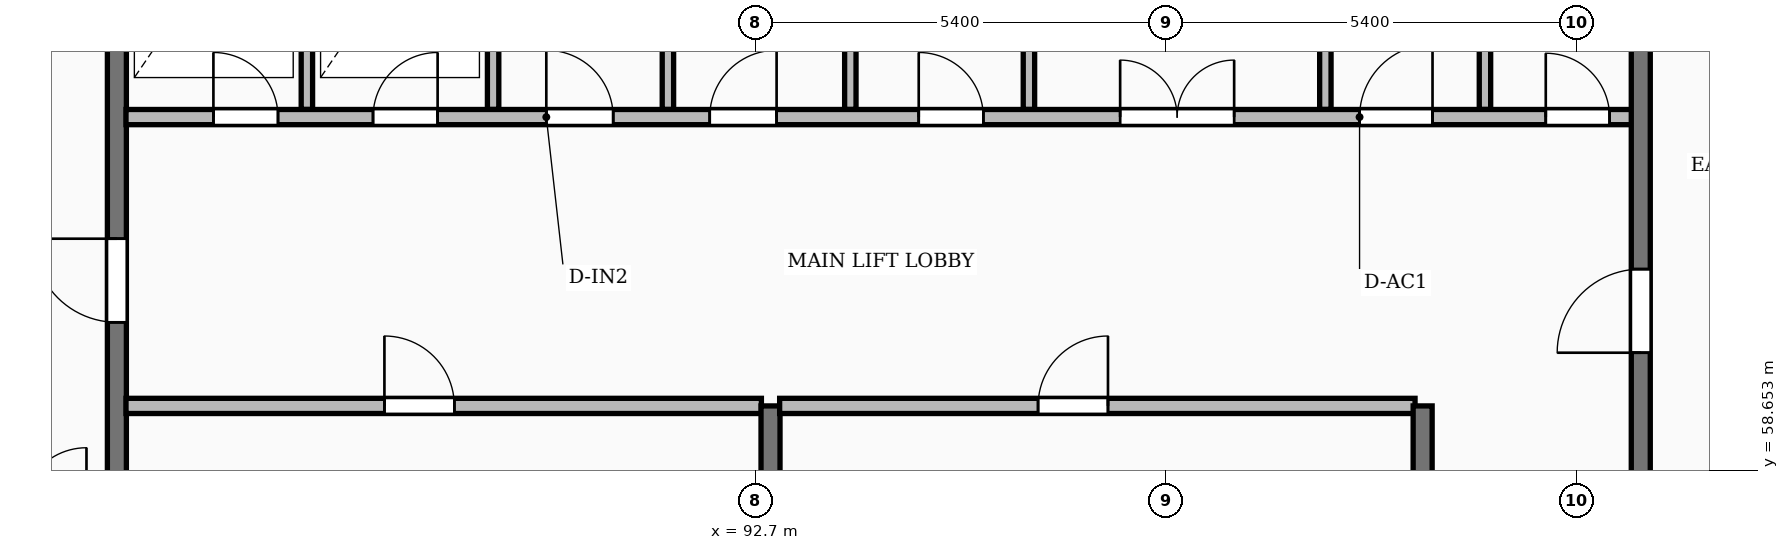
"""IFC4 building model, lengths in metres.
Left out: names, types, materials, properties, quantities, classifications, styles, units other than length and angle.
Written with IfcOpenShell. Run it as: python <this file> out.ifc"""

import sys

from ifc_helpers import new_model, si_unit, direction, frame, frame_2d, origin, place, context, subcontext, project, spatial, rectangle, extrude, element, fill, save


model = new_model("IFC4")
c1 = context("Model", 3, precision=1e-05, world=origin(), true_north=direction((0.0, 1.0)))
c2 = subcontext(c1, "Body", "Model", "MODEL_VIEW")
j1 = project(units=[si_unit("LENGTHUNIT", "METRE"), si_unit("PLANEANGLEUNIT", "RADIAN")], contexts=[c1])
p1 = place(None, origin())
s1 = spatial("IfcSite", under=j1, at=p1, CompositionType="ELEMENT")
p2 = place(p1, origin())
s2 = spatial("IfcBuilding", under=s1, at=p2, CompositionType="ELEMENT")
p3 = place(p2, frame((0.0, 0.0, 210.85)))
s3 = spatial("IfcBuildingStorey", under=s2, at=p3, CompositionType="ELEMENT", Elevation=210.85)
p4 = place(p3, frame((84.3, 55.4, 0.0), z_axis=(0.0, 0.0, 1.0), x_axis=(0.0, 1.0, 0.0)))
e1 = element("IfcWall", 1, at=p4, inside=s3, PredefinedType="SHEAR", context=c2, shape_type="SweptSolid", body=[
    extrude(rectangle(XDim=11.6, YDim=0.25, at=frame_2d((5.8, 0.0))), origin(), (0.0, 0.0, 1.0), 3.25),
])
p5 = place(p4, frame((5.2, 0.0, 0.0)))
e2 = element("IfcOpeningElement", 2, at=p5, cuts=e1, PredefinedType="OPENING", context=c2, shape_type="SweptSolid", body=[
    extrude(rectangle(XDim=1.1, YDim=2.1, at=frame_2d((0.55, 1.05))), frame((0.0, 0.135, 0.0), z_axis=(0.0, -1.0, 0.0), x_axis=(1.0, 0.0, 0.0)), (0.0, 0.0, 1.0), 0.27),
])
p6 = place(p3, frame((84.42, 59.5, 0.0), z_axis=(0.0, 0.0, 1.0), x_axis=(1.0, 0.0, 0.0)))
e3 = element("IfcWall", 3, at=p6, inside=s3, PredefinedType="PARTITIONING", context=c2, shape_type="SweptSolid", body=[
    extrude(rectangle(XDim=8.36, YDim=0.2, at=frame_2d((4.18, 0.0))), origin(), (0.0, 0.0, 1.0), 2.97),
])
p7 = place(p6, frame((3.4, 0.0, 0.0)))
e4 = element("IfcOpeningElement", 4, at=p7, cuts=e3, PredefinedType="OPENING", context=c2, shape_type="SweptSolid", body=[
    extrude(rectangle(XDim=0.92, YDim=2.08, at=frame_2d((0.46, 1.04))), frame((0.0, 0.11, 0.0), z_axis=(0.0, -1.0, 0.0), x_axis=(1.0, 0.0, 0.0)), (0.0, 0.0, 1.0), 0.22),
])
p8 = place(p3, frame((92.9, 55.4, 0.0), z_axis=(0.0, 0.0, 1.0), x_axis=(0.0, 1.0, 0.0)))
e5 = element("IfcWall", 5, at=p8, inside=s3, PredefinedType="SHEAR", context=c2, shape_type="SweptSolid", body=[
    extrude(rectangle(XDim=4.1, YDim=0.25, at=frame_2d((2.05, 0.0))), origin(), (0.0, 0.0, 1.0), 3.25),
])
p9 = place(p3, frame((93.02, 59.5, 0.0), z_axis=(0.0, 0.0, 1.0), x_axis=(1.0, 0.0, 0.0)))
e6 = element("IfcWall", 6, at=p9, inside=s3, PredefinedType="PARTITIONING", context=c2, shape_type="SweptSolid", body=[
    extrude(rectangle(XDim=8.36, YDim=0.2, at=frame_2d((4.18, 0.0))), origin(), (0.0, 0.0, 1.0), 2.97),
])
p10 = place(p9, frame((3.4, 0.0, 0.0)))
e7 = element("IfcOpeningElement", 7, at=p10, cuts=e6, PredefinedType="OPENING", context=c2, shape_type="SweptSolid", body=[
    extrude(rectangle(XDim=0.92, YDim=2.08, at=frame_2d((0.46, 1.04))), frame((0.0, 0.11, 0.0), z_axis=(0.0, -1.0, 0.0), x_axis=(1.0, 0.0, 0.0)), (0.0, 0.0, 1.0), 0.22),
])
p11 = place(p3, frame((101.48, 55.4, 0.0), z_axis=(0.0, 0.0, 1.0), x_axis=(0.0, 1.0, 0.0)))
e8 = element("IfcWall", 8, at=p11, inside=s3, PredefinedType="SHEAR", context=c2, shape_type="SweptSolid", body=[
    extrude(rectangle(XDim=4.1, YDim=0.25, at=frame_2d((2.05, 0.0))), origin(), (0.0, 0.0, 1.0), 3.25),
])
for number, where, z_axis, x_axis in (
    (9, (86.8, 63.4, 0.0), (0.0, 0.0, 1.0), (0.0, 1.0, 0.0)),
    (10, (89.25, 63.4, 0.0), (0.0, 0.0, 1.0), (0.0, 1.0, 0.0)),
    (11, (91.55, 63.4, 0.0), (0.0, 0.0, 1.0), (0.0, 1.0, 0.0)),
):
    element("IfcWall", number, at=place(p3, frame(where, z_axis=z_axis, x_axis=x_axis)), inside=s3, PredefinedType="PARTITIONING", context=c2, shape_type="SweptSolid", body=[
        extrude(rectangle(XDim=3.6, YDim=0.15, at=frame_2d((1.8, 0.0))), origin(), (0.0, 0.0, 1.0), 2.97),
    ])
p12 = place(p3, frame((93.95, 63.4, 0.0), z_axis=(0.0, 0.0, 1.0), x_axis=(0.0, 1.0, 0.0)))
e12 = element("IfcWall", 12, at=p12, inside=s3, PredefinedType="PARTITIONING", context=c2, shape_type="SweptSolid", body=[
    extrude(rectangle(XDim=3.6, YDim=0.15, at=frame_2d((1.8, 0.0))), origin(), (0.0, 0.0, 1.0), 2.277),
])
for number, where, z_axis, x_axis in (
    (13, (102.3, 63.4, 0.0), (0.0, 0.0, 1.0), (0.0, 1.0, 0.0)),
    (14, (96.3, 63.4, 0.0), (0.0, 0.0, 1.0), (0.0, 1.0, 0.0)),
    (15, (100.2, 63.4, 0.0), (0.0, 0.0, 1.0), (0.0, 1.0, 0.0)),
):
    element("IfcWall", number, at=place(p3, frame(where, z_axis=z_axis, x_axis=x_axis)), inside=s3, PredefinedType="PARTITIONING", context=c2, shape_type="SweptSolid", body=[
        extrude(rectangle(XDim=3.6, YDim=0.15, at=frame_2d((1.8, 0.0))), origin(), (0.0, 0.0, 1.0), 2.97),
    ])
p13 = place(p3, frame((84.42, 63.3, 0.0), z_axis=(0.0, 0.0, 1.0), x_axis=(1.0, 0.0, 0.0)))
e16 = element("IfcWall", 16, at=p13, inside=s3, PredefinedType="PARTITIONING", context=c2, shape_type="SweptSolid", body=[
    extrude(rectangle(XDim=19.83, YDim=0.2, at=frame_2d((9.915, 0.0))), origin(), (0.0, 0.0, 1.0), 2.97),
])
p14 = place(p13, frame((1.15, 0.0, 0.0)))
e17 = element("IfcOpeningElement", 17, at=p14, cuts=e16, PredefinedType="OPENING", context=c2, shape_type="SweptSolid", body=[
    extrude(rectangle(XDim=0.85, YDim=2.05, at=frame_2d((0.425, 1.025))), frame((0.0, 0.11, 0.0), z_axis=(0.0, -1.0, 0.0), x_axis=(1.0, 0.0, 0.0)), (0.0, 0.0, 1.0), 0.22),
])
p15 = place(p13, frame((3.25, 0.0, 0.0)))
e18 = element("IfcOpeningElement", 18, at=p15, cuts=e16, PredefinedType="OPENING", context=c2, shape_type="SweptSolid", body=[
    extrude(rectangle(XDim=0.85, YDim=2.05, at=frame_2d((0.425, 1.025))), frame((0.0, 0.11, 0.0), z_axis=(0.0, -1.0, 0.0), x_axis=(1.0, 0.0, 0.0)), (0.0, 0.0, 1.0), 0.22),
])
p16 = place(p13, frame((13.08, 0.0, 0.0)))
e19 = element("IfcOpeningElement", 19, at=p16, cuts=e16, PredefinedType="OPENING", context=c2, shape_type="SweptSolid", body=[
    extrude(rectangle(XDim=1.5, YDim=2.2, at=frame_2d((0.75, 1.1))), frame((0.0, 0.11, 0.0), z_axis=(0.0, -1.0, 0.0), x_axis=(1.0, 0.0, 0.0)), (0.0, 0.0, 1.0), 0.22),
])
p17 = place(p13, frame((5.53, 0.0, 0.0)))
e20 = element("IfcOpeningElement", 20, at=p17, cuts=e16, PredefinedType="OPENING", context=c2, shape_type="SweptSolid", body=[
    extrude(rectangle(XDim=0.88, YDim=2.06, at=frame_2d((0.44, 1.03))), frame((0.0, 0.11, 0.0), z_axis=(0.0, -1.0, 0.0), x_axis=(1.0, 0.0, 0.0)), (0.0, 0.0, 1.0), 0.22),
])
p18 = place(p13, frame((7.68, 0.0, 0.0)))
e21 = element("IfcOpeningElement", 21, at=p18, cuts=e16, PredefinedType="OPENING", context=c2, shape_type="SweptSolid", body=[
    extrude(rectangle(XDim=0.88, YDim=2.06, at=frame_2d((0.44, 1.03))), frame((0.0, 0.11, 0.0), z_axis=(0.0, -1.0, 0.0), x_axis=(1.0, 0.0, 0.0)), (0.0, 0.0, 1.0), 0.22),
])
p19 = place(p13, frame((10.43, 0.0, 0.0)))
e22 = element("IfcOpeningElement", 22, at=p19, cuts=e16, PredefinedType="OPENING", context=c2, shape_type="SweptSolid", body=[
    extrude(rectangle(XDim=0.85, YDim=2.05, at=frame_2d((0.425, 1.025))), frame((0.0, 0.11, 0.0), z_axis=(0.0, -1.0, 0.0), x_axis=(1.0, 0.0, 0.0)), (0.0, 0.0, 1.0), 0.22),
])
p20 = place(p13, frame((16.23, 0.0, 0.0)))
e23 = element("IfcOpeningElement", 23, at=p20, cuts=e16, PredefinedType="OPENING", context=c2, shape_type="SweptSolid", body=[
    extrude(rectangle(XDim=0.96, YDim=2.1, at=frame_2d((0.48, 1.05))), frame((0.0, 0.11, 0.0), z_axis=(0.0, -1.0, 0.0), x_axis=(1.0, 0.0, 0.0)), (0.0, 0.0, 1.0), 0.22),
])
p21 = place(p13, frame((18.68, 0.0, 0.0)))
e24 = element("IfcOpeningElement", 24, at=p21, cuts=e16, PredefinedType="OPENING", context=c2, shape_type="SweptSolid", body=[
    extrude(rectangle(XDim=0.84, YDim=2.04, at=frame_2d((0.42, 1.02))), frame((0.0, 0.11, 0.0), z_axis=(0.0, -1.0, 0.0), x_axis=(1.0, 0.0, 0.0)), (0.0, 0.0, 1.0), 0.22),
])
p22 = place(p3, frame((104.35, 58.4, 0.0), z_axis=(0.0, 0.0, 1.0), x_axis=(0.0, 1.0, 0.0)))
e25 = element("IfcWall", 25, at=p22, inside=s3, PredefinedType="SHEAR", context=c2, shape_type="SweptSolid", body=[
    extrude(rectangle(XDim=8.6, YDim=0.25, at=frame_2d((4.3, 0.0))), origin(), (0.0, 0.0, 1.0), 3.25),
])
p23 = place(p22, frame((1.8, 0.0, 0.0)))
e26 = element("IfcOpeningElement", 26, at=p23, cuts=e25, PredefinedType="OPENING", context=c2, shape_type="SweptSolid", body=[
    extrude(rectangle(XDim=1.1, YDim=2.1, at=frame_2d((0.55, 1.05))), frame((0.0, 0.135, 0.0), z_axis=(0.0, -1.0, 0.0), x_axis=(1.0, 0.0, 0.0)), (0.0, 0.0, 1.0), 0.27),
])
p24 = place(p5, origin())
e27 = element("IfcDoor", 27, at=p24, inside=s3, OperationType="SINGLE_SWING_RIGHT", PredefinedType="DOOR", context=c2, shape_type="SweptSolid", body=[
    extrude(rectangle(XDim=1.1, YDim=2.1, at=frame_2d((0.55, 1.05))), frame((0.0, 0.025, 0.0), z_axis=(0.0, -1.0, 0.0), x_axis=(1.0, 0.0, 0.0)), (0.0, 0.0, 1.0), 0.05),
])
fill(e2, e27)
p25 = place(p7, origin())
e28 = element("IfcDoor", 28, at=p25, inside=s3, OperationType="SINGLE_SWING_LEFT", PredefinedType="DOOR", context=c2, shape_type="SweptSolid", body=[
    extrude(rectangle(XDim=0.92, YDim=2.08, at=frame_2d((0.46, 1.04))), frame((0.0, 0.025, 0.0), z_axis=(0.0, -1.0, 0.0), x_axis=(1.0, 0.0, 0.0)), (0.0, 0.0, 1.0), 0.05),
])
fill(e4, e28)
p26 = place(p10, origin())
e29 = element("IfcDoor", 29, at=p26, inside=s3, OperationType="SINGLE_SWING_RIGHT", PredefinedType="DOOR", context=c2, shape_type="SweptSolid", body=[
    extrude(rectangle(XDim=0.92, YDim=2.08, at=frame_2d((0.46, 1.04))), frame((0.0, 0.025, 0.0), z_axis=(0.0, -1.0, 0.0), x_axis=(1.0, 0.0, 0.0)), (0.0, 0.0, 1.0), 0.05),
])
fill(e7, e29)
p27 = place(p14, origin())
e30 = element("IfcDoor", 30, at=p27, inside=s3, OperationType="SINGLE_SWING_LEFT", PredefinedType="DOOR", context=c2, shape_type="SweptSolid", body=[
    extrude(rectangle(XDim=0.85, YDim=2.05, at=frame_2d((0.425, 1.025))), frame((0.0, 0.025, 0.0), z_axis=(0.0, -1.0, 0.0), x_axis=(1.0, 0.0, 0.0)), (0.0, 0.0, 1.0), 0.05),
])
fill(e17, e30)
p28 = place(p15, origin())
e31 = element("IfcDoor", 31, at=p28, inside=s3, OperationType="SINGLE_SWING_RIGHT", PredefinedType="DOOR", context=c2, shape_type="SweptSolid", body=[
    extrude(rectangle(XDim=0.85, YDim=2.05, at=frame_2d((0.425, 1.025))), frame((0.0, 0.025, 0.0), z_axis=(0.0, -1.0, 0.0), x_axis=(1.0, 0.0, 0.0)), (0.0, 0.0, 1.0), 0.05),
])
fill(e18, e31)
p29 = place(p16, origin())
e32 = element("IfcDoor", 32, at=p29, inside=s3, OperationType="DOUBLE_DOOR_SINGLE_SWING", PredefinedType="DOOR", context=c2, shape_type="SweptSolid", body=[
    extrude(rectangle(XDim=1.5, YDim=2.2, at=frame_2d((0.75, 1.1))), frame((0.0, 0.025, 0.0), z_axis=(0.0, -1.0, 0.0), x_axis=(1.0, 0.0, 0.0)), (0.0, 0.0, 1.0), 0.05),
])
fill(e19, e32)
p30 = place(p17, origin())
e33 = element("IfcDoor", 33, at=p30, inside=s3, OperationType="SINGLE_SWING_LEFT", PredefinedType="DOOR", context=c2, shape_type="SweptSolid", body=[
    extrude(rectangle(XDim=0.88, YDim=2.06, at=frame_2d((0.44, 1.03))), frame((0.0, 0.025, 0.0), z_axis=(0.0, -1.0, 0.0), x_axis=(1.0, 0.0, 0.0)), (0.0, 0.0, 1.0), 0.05),
])
fill(e20, e33)
p31 = place(p18, origin())
e34 = element("IfcDoor", 34, at=p31, inside=s3, OperationType="SINGLE_SWING_RIGHT", PredefinedType="DOOR", context=c2, shape_type="SweptSolid", body=[
    extrude(rectangle(XDim=0.88, YDim=2.06, at=frame_2d((0.44, 1.03))), frame((0.0, 0.025, 0.0), z_axis=(0.0, -1.0, 0.0), x_axis=(1.0, 0.0, 0.0)), (0.0, 0.0, 1.0), 0.05),
])
fill(e21, e34)
p32 = place(p19, origin())
e35 = element("IfcDoor", 35, at=p32, inside=s3, OperationType="SINGLE_SWING_LEFT", PredefinedType="DOOR", context=c2, shape_type="SweptSolid", body=[
    extrude(rectangle(XDim=0.85, YDim=2.05, at=frame_2d((0.425, 1.025))), frame((0.0, 0.025, 0.0), z_axis=(0.0, -1.0, 0.0), x_axis=(1.0, 0.0, 0.0)), (0.0, 0.0, 1.0), 0.05),
])
fill(e22, e35)
p33 = place(p20, origin())
e36 = element("IfcDoor", 36, at=p33, inside=s3, OperationType="SINGLE_SWING_RIGHT", PredefinedType="DOOR", context=c2, shape_type="SweptSolid", body=[
    extrude(rectangle(XDim=0.96, YDim=2.1, at=frame_2d((0.48, 1.05))), frame((0.0, 0.025, 0.0), z_axis=(0.0, -1.0, 0.0), x_axis=(1.0, 0.0, 0.0)), (0.0, 0.0, 1.0), 0.05),
])
fill(e23, e36)
p34 = place(p21, origin())
e37 = element("IfcDoor", 37, at=p34, inside=s3, OperationType="SINGLE_SWING_LEFT", PredefinedType="DOOR", context=c2, shape_type="SweptSolid", body=[
    extrude(rectangle(XDim=0.84, YDim=2.04, at=frame_2d((0.42, 1.02))), frame((0.0, 0.025, 0.0), z_axis=(0.0, -1.0, 0.0), x_axis=(1.0, 0.0, 0.0)), (0.0, 0.0, 1.0), 0.05),
])
fill(e24, e37)
p35 = place(p23, origin())
e38 = element("IfcDoor", 38, at=p35, inside=s3, OperationType="SINGLE_SWING_LEFT", PredefinedType="DOOR", context=c2, shape_type="SweptSolid", body=[
    extrude(rectangle(XDim=1.1, YDim=2.1, at=frame_2d((0.55, 1.05))), frame((0.0, 0.025, 0.0), z_axis=(0.0, -1.0, 0.0), x_axis=(1.0, 0.0, 0.0)), (0.0, 0.0, 1.0), 0.05),
])
fill(e26, e38)
save(model, sys.argv[1])
